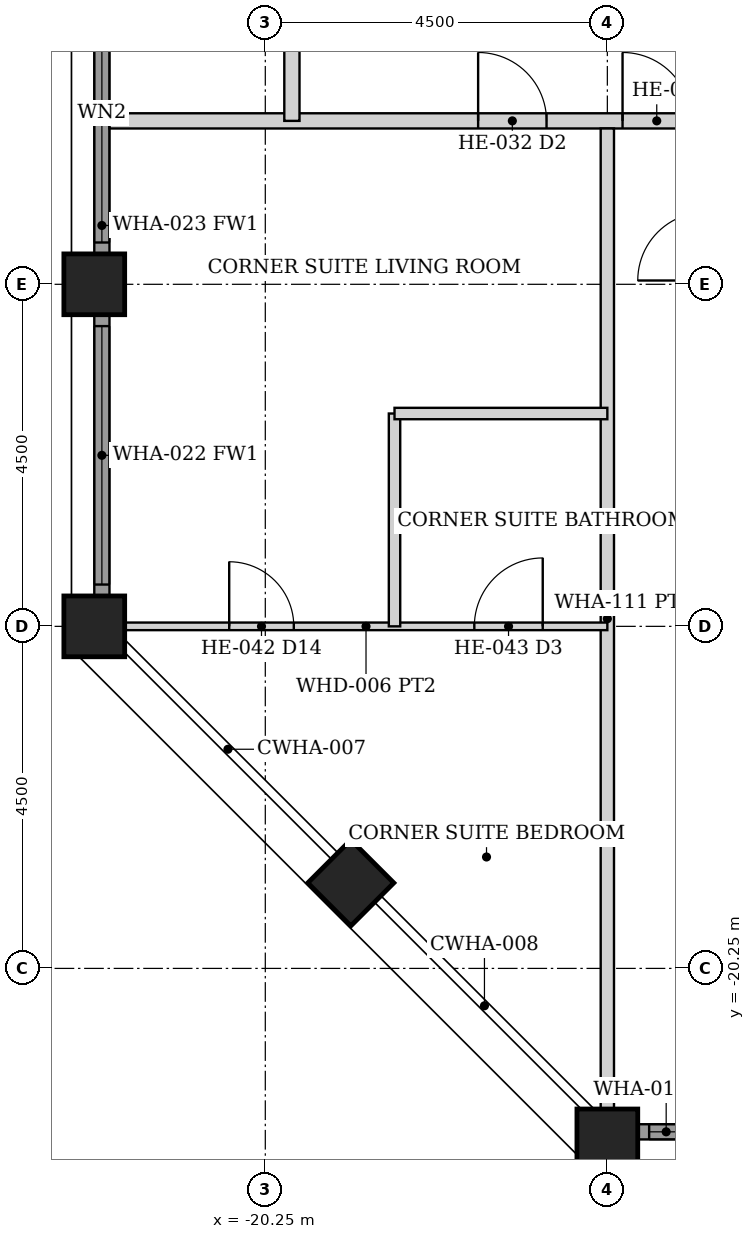
"""IFC4 building model, lengths in metres.
Left out: names, types, materials, properties, quantities, classifications, styles, units other than length and angle.
Written with IfcOpenShell. Run it as: python <this file> out.ifc"""

import sys

from ifc_helpers import new_model, si_unit, direction, frame, frame_2d, origin, origin_2d, place, context, subcontext, project, spatial, rectangle, hollow_rectangle, extrude, element, fill, save


model = new_model("IFC4")
c1 = context("Model", 3, precision=1e-05, world=origin(), true_north=direction((0.0, 1.0)))
c2 = subcontext(c1, "Body", "Model", "MODEL_VIEW")
j1 = project(units=[si_unit("LENGTHUNIT", "METRE"), si_unit("PLANEANGLEUNIT", "RADIAN")], contexts=[c1])
p1 = place(None, origin())
s1 = spatial("IfcSite", under=j1, at=p1, CompositionType="ELEMENT")
p2 = place(p1, origin())
s2 = spatial("IfcBuilding", under=s1, at=p2, CompositionType="ELEMENT")
p3 = place(p2, frame((0.0, 0.0, 161.6)))
s3 = spatial("IfcBuildingStorey", under=s2, at=p3, CompositionType="ELEMENT", Elevation=161.6)
for number, where, z_axis, x_axis in (
    (1, (-15.75, -22.5, 0.0), (0.0, 0.0, 1.0), (0.0, 1.0, 0.0)),
    (2, (-22.5, -15.75, 0.0), (0.0, 0.0, 1.0), (1.0, 0.0, 0.0)),
    (3, (-22.5, -11.25, 0.0), (0.0, 0.0, 1.0), (1.0, 0.0, 0.0)),
    (4, (-19.125, -19.125, 0.0), (0.0, 0.0, 1.0), (0.707, 0.707, 0.0)),
):
    element("IfcColumn", number, at=place(p3, frame(where, z_axis=z_axis, x_axis=x_axis)), inside=s3, PredefinedType="COLUMN", context=c2, shape_type="SweptSolid", body=[
        extrude(hollow_rectangle(XDim=0.8, YDim=0.8, WallThickness=0.05, at=origin_2d()), origin(), (0.0, 0.0, 1.0), 3.6),
    ])
p4 = place(p3, frame((-15.345, -22.4, 0.0), z_axis=(0.0, 0.0, 1.0), x_axis=(1.0, 0.0, 0.0)))
e5 = element("IfcWall", 5, at=p4, inside=s3, PredefinedType="SOLIDWALL", context=c2, shape_type="SweptSolid", body=[
    extrude(rectangle(XDim=3.69, YDim=0.2, at=frame_2d((1.845, 0.0))), origin(), (0.0, 0.0, 1.0), 2.479),
])
p5 = place(p4, frame((0.145, 0.0, 0.3)))
e6 = element("IfcOpeningElement", 6, at=p5, cuts=e5, PredefinedType="OPENING", context=c2, shape_type="SweptSolid", body=[
    extrude(rectangle(XDim=3.4, YDim=2.029, at=frame_2d((1.7, 1.015))), frame((0.0, 0.11, 0.0), z_axis=(0.0, -1.0, 0.0), x_axis=(1.0, 0.0, 0.0)), (0.0, 0.0, 1.0), 0.22),
])
p6 = place(p3, frame((-22.4, -15.345, 0.0), z_axis=(0.0, 0.0, 1.0), x_axis=(0.0, 1.0, 0.0)))
e7 = element("IfcWall", 7, at=p6, inside=s3, PredefinedType="SOLIDWALL", context=c2, shape_type="SweptSolid", body=[
    extrude(rectangle(XDim=3.69, YDim=0.2, at=frame_2d((1.845, 0.0))), origin(), (0.0, 0.0, 1.0), 2.479),
])
p7 = place(p6, frame((0.145, 0.0, 0.3)))
e8 = element("IfcOpeningElement", 8, at=p7, cuts=e7, PredefinedType="OPENING", context=c2, shape_type="SweptSolid", body=[
    extrude(rectangle(XDim=3.4, YDim=2.029, at=frame_2d((1.7, 1.015))), frame((0.0, 0.11, 0.0), z_axis=(0.0, -1.0, 0.0), x_axis=(1.0, 0.0, 0.0)), (0.0, 0.0, 1.0), 0.22),
])
p8 = place(p3, frame((-22.4, -10.845, 0.0), z_axis=(0.0, 0.0, 1.0), x_axis=(0.0, 1.0, 0.0)))
e9 = element("IfcWall", 9, at=p8, inside=s3, PredefinedType="SOLIDWALL", context=c2, shape_type="SweptSolid", body=[
    extrude(rectangle(XDim=3.69, YDim=0.2, at=frame_2d((1.845, 0.0))), origin(), (0.0, 0.0, 1.0), 2.479),
])
p9 = place(p8, frame((0.145, 0.0, 0.3)))
e10 = element("IfcOpeningElement", 10, at=p9, cuts=e9, PredefinedType="OPENING", context=c2, shape_type="SweptSolid", body=[
    extrude(rectangle(XDim=3.4, YDim=2.029, at=frame_2d((1.7, 1.015))), frame((0.0, 0.11, 0.0), z_axis=(0.0, -1.0, 0.0), x_axis=(1.0, 0.0, 0.0)), (0.0, 0.0, 1.0), 0.22),
])
p10 = place(p3, frame((-22.3, -9.1, 0.0), z_axis=(0.0, 0.0, 1.0), x_axis=(1.0, 0.0, 0.0)))
e11 = element("IfcWall", 11, at=p10, inside=s3, PredefinedType="PARTITIONING", context=c2, shape_type="SweptSolid", body=[
    extrude(rectangle(XDim=44.6, YDim=0.2, at=frame_2d((22.3, 0.0))), origin(), (0.0, 0.0, 1.0), 2.473),
])
p11 = place(p10, frame((6.75, 0.0, 0.0)))
e12 = element("IfcOpeningElement", 12, at=p11, cuts=e11, PredefinedType="OPENING", context=c2, shape_type="SweptSolid", body=[
    extrude(rectangle(XDim=0.9, YDim=2.1, at=frame_2d((0.45, 1.05))), frame((0.0, 0.11, 0.0), z_axis=(0.0, -1.0, 0.0), x_axis=(1.0, 0.0, 0.0)), (0.0, 0.0, 1.0), 0.22),
])
p12 = place(p10, frame((23.45, 0.0, 0.0)))
e13 = element("IfcOpeningElement", 13, at=p12, cuts=e11, PredefinedType="OPENING", context=c2, shape_type="SweptSolid", body=[
    extrude(rectangle(XDim=0.9, YDim=2.1, at=frame_2d((0.45, 1.05))), frame((0.0, 0.11, 0.0), z_axis=(0.0, -1.0, 0.0), x_axis=(1.0, 0.0, 0.0)), (0.0, 0.0, 1.0), 0.22),
])
p13 = place(p10, frame((27.95, 0.0, 0.0)))
e14 = element("IfcOpeningElement", 14, at=p13, cuts=e11, PredefinedType="OPENING", context=c2, shape_type="SweptSolid", body=[
    extrude(rectangle(XDim=0.9, YDim=2.1, at=frame_2d((0.45, 1.05))), frame((0.0, 0.11, 0.0), z_axis=(0.0, -1.0, 0.0), x_axis=(1.0, 0.0, 0.0)), (0.0, 0.0, 1.0), 0.22),
])
p14 = place(p10, frame((36.95, 0.0, 0.0)))
e15 = element("IfcOpeningElement", 15, at=p14, cuts=e11, PredefinedType="OPENING", context=c2, shape_type="SweptSolid", body=[
    extrude(rectangle(XDim=0.9, YDim=2.1, at=frame_2d((0.45, 1.05))), frame((0.0, 0.11, 0.0), z_axis=(0.0, -1.0, 0.0), x_axis=(1.0, 0.0, 0.0)), (0.0, 0.0, 1.0), 0.22),
])
p15 = place(p10, frame((38.85, 0.0, 0.0)))
e16 = element("IfcOpeningElement", 16, at=p15, cuts=e11, PredefinedType="OPENING", context=c2, shape_type="SweptSolid", body=[
    extrude(rectangle(XDim=0.9, YDim=2.1, at=frame_2d((0.45, 1.05))), frame((0.0, 0.11, 0.0), z_axis=(0.0, -1.0, 0.0), x_axis=(1.0, 0.0, 0.0)), (0.0, 0.0, 1.0), 0.22),
])
p16 = place(p10, frame((4.85, 0.0, 0.0)))
e17 = element("IfcOpeningElement", 17, at=p16, cuts=e11, PredefinedType="OPENING", context=c2, shape_type="SweptSolid", body=[
    extrude(rectangle(XDim=0.9, YDim=2.1, at=frame_2d((0.45, 1.05))), frame((0.0, 0.11, 0.0), z_axis=(0.0, -1.0, 0.0), x_axis=(1.0, 0.0, 0.0)), (0.0, 0.0, 1.0), 0.22),
])
p17 = place(p3, frame((-19.9, -9.1, 0.0), z_axis=(0.0, 0.0, 1.0), x_axis=(0.0, 1.0, 0.0)))
e18 = element("IfcWall", 18, at=p17, inside=s3, PredefinedType="PARTITIONING", context=c2, shape_type="SweptSolid", body=[
    extrude(rectangle(XDim=18.2, YDim=0.2, at=frame_2d((9.1, 0.0))), origin(), (0.0, 0.0, 1.0), 2.473),
])
p18 = place(p17, frame((8.6, 0.0, 0.0)))
e19 = element("IfcOpeningElement", 19, at=p18, cuts=e18, PredefinedType="OPENING", context=c2, shape_type="SweptSolid", body=[
    extrude(rectangle(XDim=1.0, YDim=2.1, at=frame_2d((0.5, 1.05))), frame((0.0, 0.11, 0.0), z_axis=(0.0, -1.0, 0.0), x_axis=(1.0, 0.0, 0.0)), (0.0, 0.0, 1.0), 0.22),
])
p19 = place(p3, frame((-15.75, -22.1, 0.0), z_axis=(0.0, 0.0, 1.0), x_axis=(0.0, 1.0, 0.0)))
e20 = element("IfcWall", 20, at=p19, inside=s3, PredefinedType="PARTITIONING", context=c2, shape_type="SweptSolid", body=[
    extrude(rectangle(XDim=12.9, YDim=0.175, at=frame_2d((6.45, 0.0))), origin(), (0.0, 0.0, 1.0), 2.473),
])
p20 = place(p3, frame((-22.1, -15.75, 0.0), z_axis=(0.0, 0.0, 1.0), x_axis=(1.0, 0.0, 0.0)))
e21 = element("IfcWall", 21, at=p20, inside=s3, PredefinedType="PARTITIONING", context=c2, shape_type="SweptSolid", body=[
    extrude(rectangle(XDim=6.35, YDim=0.1, at=frame_2d((3.175, 0.0))), origin(), (0.0, 0.0, 1.0), 2.473),
])
p21 = place(p20, frame((1.375, 0.0, 0.0)))
e22 = element("IfcOpeningElement", 22, at=p21, cuts=e21, PredefinedType="OPENING", context=c2, shape_type="SweptSolid", body=[
    extrude(rectangle(XDim=0.85, YDim=2.1, at=frame_2d((0.425, 1.05))), frame((0.0, 0.06, 0.0), z_axis=(0.0, -1.0, 0.0), x_axis=(1.0, 0.0, 0.0)), (0.0, 0.0, 1.0), 0.12),
])
p22 = place(p20, frame((4.6, 0.0, 0.0)))
e23 = element("IfcOpeningElement", 23, at=p22, cuts=e21, PredefinedType="OPENING", context=c2, shape_type="SweptSolid", body=[
    extrude(rectangle(XDim=0.9, YDim=2.1, at=frame_2d((0.45, 1.05))), frame((0.0, 0.06, 0.0), z_axis=(0.0, -1.0, 0.0), x_axis=(1.0, 0.0, 0.0)), (0.0, 0.0, 1.0), 0.12),
])
for number, where, z_axis, x_axis in (
    (24, (-18.55, -15.75, 0.0), (0.0, 0.0, 1.0), (0.0, 1.0, 0.0)),
    (25, (-18.55, -12.95, 0.0), (0.0, 0.0, 1.0), (1.0, 0.0, 0.0)),
):
    element("IfcWall", number, at=place(p3, frame(where, z_axis=z_axis, x_axis=x_axis)), inside=s3, PredefinedType="PARTITIONING", context=c2, shape_type="SweptSolid", body=[
        extrude(rectangle(XDim=2.8, YDim=0.15, at=frame_2d((1.4, 0.0))), origin(), (0.0, 0.0, 1.0), 2.473),
    ])
p23 = place(p5, origin())
e26 = element("IfcWindow", 26, at=p23, inside=s3, PartitioningType="SINGLE_PANEL", PredefinedType="WINDOW", context=c2, shape_type="SweptSolid", body=[
    extrude(rectangle(XDim=3.4, YDim=2.029, at=frame_2d((1.7, 1.015))), frame((0.0, 0.03, 0.0), z_axis=(0.0, -1.0, 0.0), x_axis=(1.0, 0.0, 0.0)), (0.0, 0.0, 1.0), 0.06),
])
fill(e6, e26)
p24 = place(p7, origin())
e27 = element("IfcWindow", 27, at=p24, inside=s3, PartitioningType="SINGLE_PANEL", PredefinedType="WINDOW", context=c2, shape_type="SweptSolid", body=[
    extrude(rectangle(XDim=3.4, YDim=2.029, at=frame_2d((1.7, 1.015))), frame((0.0, 0.03, 0.0), z_axis=(0.0, -1.0, 0.0), x_axis=(1.0, 0.0, 0.0)), (0.0, 0.0, 1.0), 0.06),
])
fill(e8, e27)
p25 = place(p9, origin())
e28 = element("IfcWindow", 28, at=p25, inside=s3, PartitioningType="SINGLE_PANEL", PredefinedType="WINDOW", context=c2, shape_type="SweptSolid", body=[
    extrude(rectangle(XDim=3.4, YDim=2.029, at=frame_2d((1.7, 1.015))), frame((0.0, 0.03, 0.0), z_axis=(0.0, -1.0, 0.0), x_axis=(1.0, 0.0, 0.0)), (0.0, 0.0, 1.0), 0.06),
])
fill(e10, e28)
p26 = place(p11, origin())
e29 = element("IfcDoor", 29, at=p26, inside=s3, OperationType="SINGLE_SWING_LEFT", PredefinedType="DOOR", context=c2, shape_type="SweptSolid", body=[
    extrude(rectangle(XDim=0.9, YDim=2.1, at=frame_2d((0.45, 1.05))), frame((0.0, 0.025, 0.0), z_axis=(0.0, -1.0, 0.0), x_axis=(1.0, 0.0, 0.0)), (0.0, 0.0, 1.0), 0.05),
])
fill(e12, e29)
p27 = place(p16, origin())
e30 = element("IfcDoor", 30, at=p27, inside=s3, OperationType="SINGLE_SWING_LEFT", PredefinedType="DOOR", context=c2, shape_type="SweptSolid", body=[
    extrude(rectangle(XDim=0.9, YDim=2.1, at=frame_2d((0.45, 1.05))), frame((0.0, 0.025, 0.0), z_axis=(0.0, -1.0, 0.0), x_axis=(1.0, 0.0, 0.0)), (0.0, 0.0, 1.0), 0.05),
])
fill(e17, e30)
p28 = place(p21, origin())
e31 = element("IfcDoor", 31, at=p28, inside=s3, OperationType="SINGLE_SWING_LEFT", PredefinedType="DOOR", context=c2, shape_type="SweptSolid", body=[
    extrude(rectangle(XDim=0.85, YDim=2.1, at=frame_2d((0.425, 1.05))), frame((0.0, 0.025, 0.0), z_axis=(0.0, -1.0, 0.0), x_axis=(1.0, 0.0, 0.0)), (0.0, 0.0, 1.0), 0.05),
])
fill(e22, e31)
p29 = place(p22, origin())
e32 = element("IfcDoor", 32, at=p29, inside=s3, OperationType="SINGLE_SWING_RIGHT", PredefinedType="DOOR", context=c2, shape_type="SweptSolid", body=[
    extrude(rectangle(XDim=0.9, YDim=2.1, at=frame_2d((0.45, 1.05))), frame((0.0, 0.025, 0.0), z_axis=(0.0, -1.0, 0.0), x_axis=(1.0, 0.0, 0.0)), (0.0, 0.0, 1.0), 0.05),
])
fill(e23, e32)
save(model, sys.argv[1])
